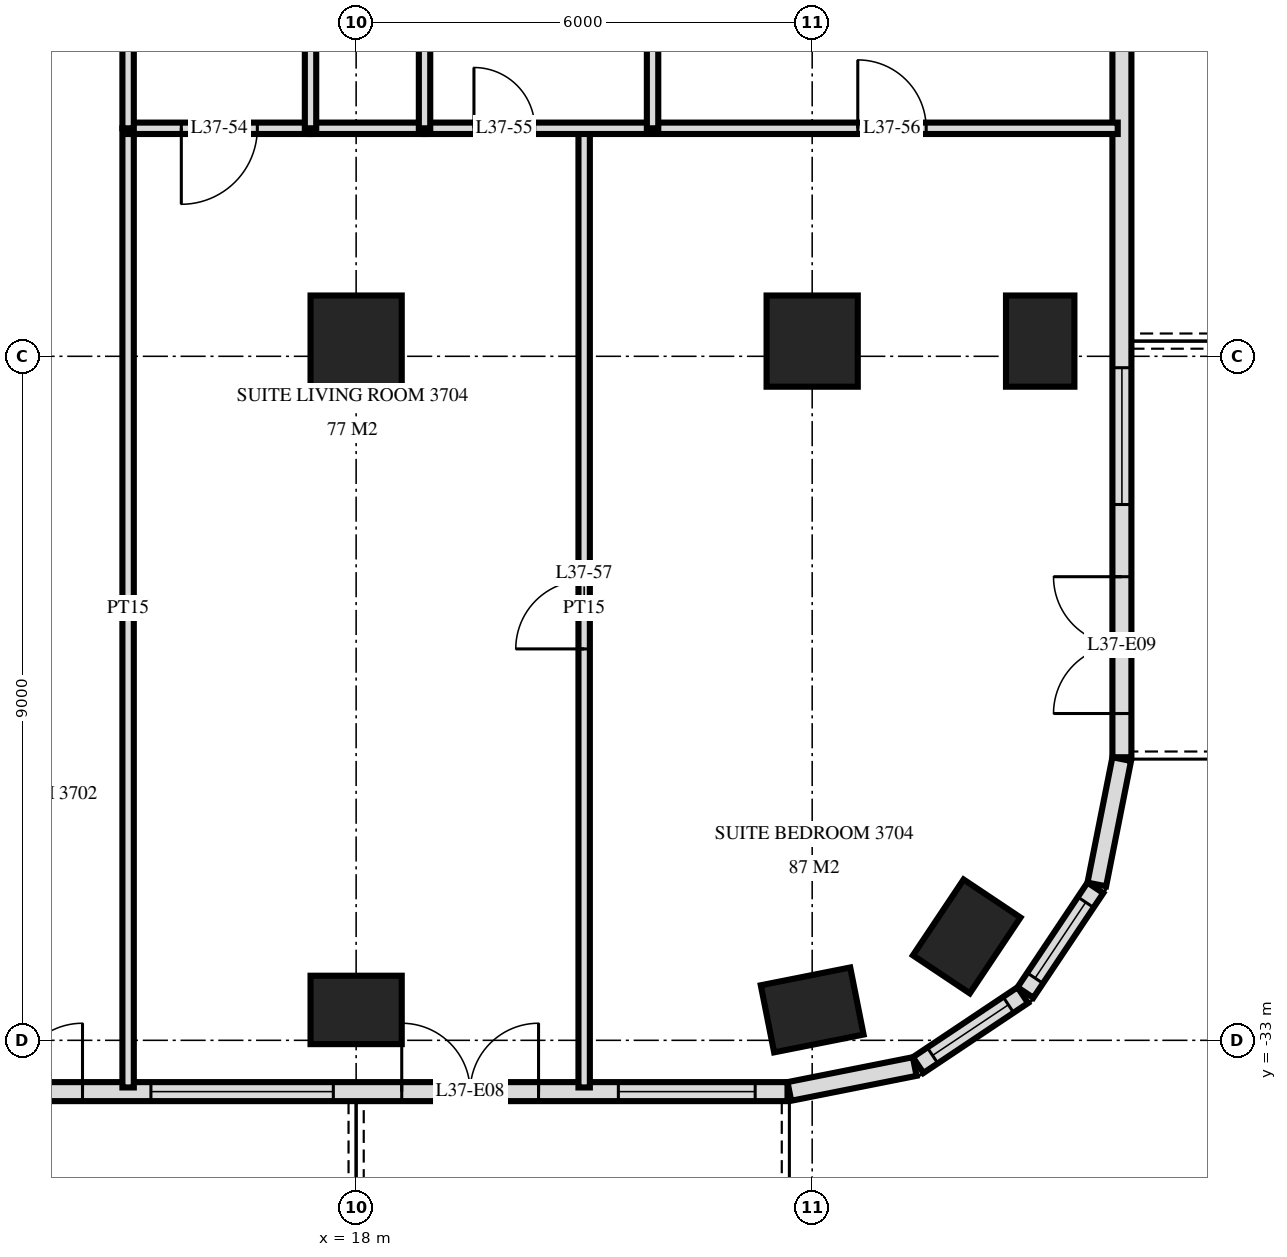
"""IFC4 building model, lengths in metres.
Left out: names, types, materials, properties, quantities, classifications, styles, units other than length and angle.
Written with IfcOpenShell. Run it as: python <this file> out.ifc"""

import sys

from ifc_helpers import new_model, si_unit, direction, frame, frame_2d, origin, origin_2d, place, context, subcontext, project, spatial, rectangle, extrude, element, fill, save


model = new_model("IFC4")
c1 = context("Model", 3, precision=1e-05, world=origin(), true_north=direction((0.0, 1.0)))
c2 = subcontext(c1, "Body", "Model", "MODEL_VIEW")
j1 = project(units=[si_unit("LENGTHUNIT", "METRE"), si_unit("PLANEANGLEUNIT", "RADIAN")], contexts=[c1])
p1 = place(None, origin())
s1 = spatial("IfcSite", under=j1, at=p1, CompositionType="ELEMENT")
p2 = place(p1, origin())
s2 = spatial("IfcBuilding", under=s1, at=p2, CompositionType="ELEMENT")
p3 = place(p2, frame((0.0, 0.0, 145.2)))
s3 = spatial("IfcBuildingStorey", under=s2, at=p3, CompositionType="ELEMENT", Elevation=145.2)
p4 = place(p3, frame((18.0, -32.6, 0.0), z_axis=(0.0, 0.0, 1.0), x_axis=(1.0, 0.0, 0.0)))
e1 = element("IfcColumn", 1, at=p4, inside=s3, PredefinedType="COLUMN", context=c2, shape_type="SweptSolid", body=[
    extrude(rectangle(XDim=1.2, YDim=0.9, at=origin_2d()), origin(), (0.0, 0.0, 1.0), 3.6),
])
p5 = place(p3, frame((18.0, -23.8, 0.0), z_axis=(0.0, 0.0, 1.0), x_axis=(1.0, 0.0, 0.0)))
e2 = element("IfcColumn", 2, at=p5, inside=s3, PredefinedType="COLUMN", context=c2, shape_type="SweptSolid", body=[
    extrude(rectangle(XDim=1.2, YDim=1.2, at=origin_2d()), origin(), (0.0, 0.0, 1.0), 3.6),
])
p6 = place(p3, frame((24.0, -32.6, 0.0), z_axis=(0.0, 0.0, 1.0), x_axis=(0.980792089743, 0.195056086032, 0.0)))
e3 = element("IfcColumn", 3, at=p6, inside=s3, PredefinedType="COLUMN", context=c2, shape_type="SweptSolid", body=[
    extrude(rectangle(XDim=1.2, YDim=0.9, at=origin_2d()), origin(), (0.0, 0.0, 1.0), 3.6),
])
p7 = place(p3, frame((24.0, -23.8, 0.0), z_axis=(0.0, 0.0, 1.0), x_axis=(1.0, 0.0, 0.0)))
e4 = element("IfcColumn", 4, at=p7, inside=s3, PredefinedType="COLUMN", context=c2, shape_type="SweptSolid", body=[
    extrude(rectangle(XDim=1.2, YDim=1.2, at=origin_2d()), origin(), (0.0, 0.0, 1.0), 3.6),
])
for number, where, z_axis, x_axis in (
    (5, (26.033, -31.633, 0.0), (0.0, 0.0, 1.0), (0.556, 0.831, 0.0)),
    (6, (27.0, -23.8, 0.0), (0.0, 0.0, 1.0), (0.0, 1.0, 0.0)),
):
    element("IfcColumn", number, at=place(p3, frame(where, z_axis=z_axis, x_axis=x_axis)), inside=s3, PredefinedType="COLUMN", context=c2, shape_type="SweptSolid", body=[
        extrude(rectangle(XDim=1.2, YDim=0.9, at=origin_2d()), origin(), (0.0, 0.0, 1.0), 3.6),
    ])
p8 = place(p3, frame((-23.675, -33.675, 0.0), z_axis=(0.0, 0.0, 1.0), x_axis=(1.0, 0.0, 0.0)))
e7 = element("IfcWall", 7, at=p8, inside=s3, PredefinedType="SOLIDWALL", context=c2, shape_type="SweptSolid", body=[
    extrude(rectangle(XDim=47.351, YDim=0.25, at=frame_2d((23.675, 0.0))), origin(), (0.0, 0.0, 1.0), 3.32),
])
p9 = place(p8, frame((3.425, 0.0, 0.0)))
e8 = element("IfcOpeningElement", 8, at=p9, cuts=e7, PredefinedType="OPENING", context=c2, shape_type="SweptSolid", body=[
    extrude(rectangle(XDim=1.8, YDim=2.4, at=frame_2d((0.9, 1.2))), frame((0.0, 0.135, 0.0), z_axis=(0.0, -1.0, 0.0), x_axis=(1.0, 0.0, 0.0)), (0.0, 0.0, 1.0), 0.27),
])
p10 = place(p8, frame((6.275, 0.0, 0.0)))
e9 = element("IfcOpeningElement", 9, at=p10, cuts=e7, PredefinedType="OPENING", context=c2, shape_type="SweptSolid", body=[
    extrude(rectangle(XDim=1.8, YDim=2.4, at=frame_2d((0.9, 1.2))), frame((0.0, 0.135, 0.0), z_axis=(0.0, -1.0, 0.0), x_axis=(1.0, 0.0, 0.0)), (0.0, 0.0, 1.0), 0.27),
])
p11 = place(p8, frame((8.975, 0.0, 0.3)))
e10 = element("IfcOpeningElement", 10, at=p11, cuts=e7, PredefinedType="OPENING", context=c2, shape_type="SweptSolid", body=[
    extrude(rectangle(XDim=2.4, YDim=2.1, at=frame_2d((1.2, 1.05))), frame((0.0, 0.135, 0.0), z_axis=(0.0, -1.0, 0.0), x_axis=(1.0, 0.0, 0.0)), (0.0, 0.0, 1.0), 0.27),
])
p12 = place(p8, frame((12.275, 0.0, 0.0)))
e11 = element("IfcOpeningElement", 11, at=p12, cuts=e7, PredefinedType="OPENING", context=c2, shape_type="SweptSolid", body=[
    extrude(rectangle(XDim=1.8, YDim=2.4, at=frame_2d((0.9, 1.2))), frame((0.0, 0.135, 0.0), z_axis=(0.0, -1.0, 0.0), x_axis=(1.0, 0.0, 0.0)), (0.0, 0.0, 1.0), 0.27),
])
p13 = place(p8, frame((14.975, 0.0, 0.3)))
e12 = element("IfcOpeningElement", 12, at=p13, cuts=e7, PredefinedType="OPENING", context=c2, shape_type="SweptSolid", body=[
    extrude(rectangle(XDim=2.4, YDim=2.1, at=frame_2d((1.2, 1.05))), frame((0.0, 0.135, 0.0), z_axis=(0.0, -1.0, 0.0), x_axis=(1.0, 0.0, 0.0)), (0.0, 0.0, 1.0), 0.27),
])
p14 = place(p8, frame((21.275, 0.0, 0.0)))
e13 = element("IfcOpeningElement", 13, at=p14, cuts=e7, PredefinedType="OPENING", context=c2, shape_type="SweptSolid", body=[
    extrude(rectangle(XDim=1.8, YDim=2.4, at=frame_2d((0.9, 1.2))), frame((0.0, 0.135, 0.0), z_axis=(0.0, -1.0, 0.0), x_axis=(1.0, 0.0, 0.0)), (0.0, 0.0, 1.0), 0.27),
])
p15 = place(p8, frame((24.275, 0.0, 0.0)))
e14 = element("IfcOpeningElement", 14, at=p15, cuts=e7, PredefinedType="OPENING", context=c2, shape_type="SweptSolid", body=[
    extrude(rectangle(XDim=1.8, YDim=2.4, at=frame_2d((0.9, 1.2))), frame((0.0, 0.135, 0.0), z_axis=(0.0, -1.0, 0.0), x_axis=(1.0, 0.0, 0.0)), (0.0, 0.0, 1.0), 0.27),
])
p16 = place(p8, frame((30.275, 0.0, 0.0)))
e15 = element("IfcOpeningElement", 15, at=p16, cuts=e7, PredefinedType="OPENING", context=c2, shape_type="SweptSolid", body=[
    extrude(rectangle(XDim=1.8, YDim=2.4, at=frame_2d((0.9, 1.2))), frame((0.0, 0.135, 0.0), z_axis=(0.0, -1.0, 0.0), x_axis=(1.0, 0.0, 0.0)), (0.0, 0.0, 1.0), 0.27),
])
p17 = place(p8, frame((32.975, 0.0, 0.3)))
e16 = element("IfcOpeningElement", 16, at=p17, cuts=e7, PredefinedType="OPENING", context=c2, shape_type="SweptSolid", body=[
    extrude(rectangle(XDim=2.4, YDim=2.1, at=frame_2d((1.2, 1.05))), frame((0.0, 0.135, 0.0), z_axis=(0.0, -1.0, 0.0), x_axis=(1.0, 0.0, 0.0)), (0.0, 0.0, 1.0), 0.27),
])
p18 = place(p8, frame((36.275, 0.0, 0.0)))
e17 = element("IfcOpeningElement", 17, at=p18, cuts=e7, PredefinedType="OPENING", context=c2, shape_type="SweptSolid", body=[
    extrude(rectangle(XDim=1.8, YDim=2.4, at=frame_2d((0.9, 1.2))), frame((0.0, 0.135, 0.0), z_axis=(0.0, -1.0, 0.0), x_axis=(1.0, 0.0, 0.0)), (0.0, 0.0, 1.0), 0.27),
])
p19 = place(p8, frame((38.975, 0.0, 0.3)))
e18 = element("IfcOpeningElement", 18, at=p19, cuts=e7, PredefinedType="OPENING", context=c2, shape_type="SweptSolid", body=[
    extrude(rectangle(XDim=2.4, YDim=2.1, at=frame_2d((1.2, 1.05))), frame((0.0, 0.135, 0.0), z_axis=(0.0, -1.0, 0.0), x_axis=(1.0, 0.0, 0.0)), (0.0, 0.0, 1.0), 0.27),
])
p20 = place(p8, frame((42.275, 0.0, 0.0)))
e19 = element("IfcOpeningElement", 19, at=p20, cuts=e7, PredefinedType="OPENING", context=c2, shape_type="SweptSolid", body=[
    extrude(rectangle(XDim=1.8, YDim=2.4, at=frame_2d((0.9, 1.2))), frame((0.0, 0.135, 0.0), z_axis=(0.0, -1.0, 0.0), x_axis=(1.0, 0.0, 0.0)), (0.0, 0.0, 1.0), 0.27),
])
p21 = place(p8, frame((45.125, 0.0, 0.3)))
e20 = element("IfcOpeningElement", 20, at=p21, cuts=e7, PredefinedType="OPENING", context=c2, shape_type="SweptSolid", body=[
    extrude(rectangle(XDim=1.8, YDim=2.1, at=frame_2d((0.9, 1.05))), frame((0.0, 0.135, 0.0), z_axis=(0.0, -1.0, 0.0), x_axis=(1.0, 0.0, 0.0)), (0.0, 0.0, 1.0), 0.27),
])
p22 = place(p3, frame((23.7, -33.673, 0.0), z_axis=(0.0, 0.0, 1.0), x_axis=(0.980775640221, 0.19513878023, 0.0)))
e21 = element("IfcWall", 21, at=p22, inside=s3, PredefinedType="SOLIDWALL", context=c2, shape_type="SweptSolid", body=[
    extrude(rectangle(XDim=1.681, YDim=0.25, at=frame_2d((0.841, 0.0))), origin(), (0.0, 0.0, 1.0), 3.32),
])
p23 = place(p3, frame((25.394, -33.326, 0.0), z_axis=(0.0, 0.0, 1.0), x_axis=(0.831482937015, 0.55555029066, 0.0)))
e22 = element("IfcWall", 22, at=p23, inside=s3, PredefinedType="SOLIDWALL", context=c2, shape_type="SweptSolid", body=[
    extrude(rectangle(XDim=1.656, YDim=0.25, at=frame_2d((0.828, 0.0))), origin(), (0.0, 0.0, 1.0), 3.32),
])
p24 = place(p23, frame((0.228, 0.0, 0.9)))
e23 = element("IfcOpeningElement", 23, at=p24, cuts=e22, PredefinedType="OPENING", context=c2, shape_type="SweptSolid", body=[
    extrude(rectangle(XDim=1.2, YDim=1.5, at=frame_2d((0.6, 0.75))), frame((0.0, 0.135, 0.0), z_axis=(0.0, -1.0, 0.0), x_axis=(1.0, 0.0, 0.0)), (0.0, 0.0, 1.0), 0.27),
])
p25 = place(p3, frame((26.806, -32.371, 0.0), z_axis=(0.0, 0.0, 1.0), x_axis=(0.55555029066, 0.831482937015, 0.0)))
e24 = element("IfcWall", 24, at=p25, inside=s3, PredefinedType="SOLIDWALL", context=c2, shape_type="SweptSolid", body=[
    extrude(rectangle(XDim=1.656, YDim=0.25, at=frame_2d((0.828, 0.0))), origin(), (0.0, 0.0, 1.0), 3.32),
])
p26 = place(p25, frame((0.228, 0.0, 0.9)))
e25 = element("IfcOpeningElement", 25, at=p26, cuts=e24, PredefinedType="OPENING", context=c2, shape_type="SweptSolid", body=[
    extrude(rectangle(XDim=1.2, YDim=1.5, at=frame_2d((0.6, 0.75))), frame((0.0, 0.135, 0.0), z_axis=(0.0, -1.0, 0.0), x_axis=(1.0, 0.0, 0.0)), (0.0, 0.0, 1.0), 0.27),
])
p27 = place(p3, frame((27.745, -30.949, 0.0), z_axis=(0.0, 0.0, 1.0), x_axis=(0.194999110559, 0.980803419081, 0.0)))
e26 = element("IfcWall", 26, at=p27, inside=s3, PredefinedType="SOLIDWALL", context=c2, shape_type="SweptSolid", body=[
    extrude(rectangle(XDim=1.681, YDim=0.25, at=frame_2d((0.841, 0.0))), origin(), (0.0, 0.0, 1.0), 3.32),
])
p28 = place(p3, frame((28.075, -29.275, 0.0), z_axis=(0.0, 0.0, 1.0), x_axis=(0.0, 1.0, 0.0)))
e27 = element("IfcWall", 27, at=p28, inside=s3, PredefinedType="SOLIDWALL", context=c2, shape_type="SweptSolid", body=[
    extrude(rectangle(XDim=25.951, YDim=0.25, at=frame_2d((12.975, 0.0))), origin(), (0.0, 0.0, 1.0), 3.32),
])
p29 = place(p28, frame((0.575, 0.0, 0.0)))
e28 = element("IfcOpeningElement", 28, at=p29, cuts=e27, PredefinedType="OPENING", context=c2, shape_type="SweptSolid", body=[
    extrude(rectangle(XDim=1.8, YDim=2.4, at=frame_2d((0.9, 1.2))), frame((0.0, 0.135, 0.0), z_axis=(0.0, -1.0, 0.0), x_axis=(1.0, 0.0, 0.0)), (0.0, 0.0, 1.0), 0.27),
])
p30 = place(p28, frame((3.325, 0.0, 0.3)))
e29 = element("IfcOpeningElement", 29, at=p30, cuts=e27, PredefinedType="OPENING", context=c2, shape_type="SweptSolid", body=[
    extrude(rectangle(XDim=1.8, YDim=2.1, at=frame_2d((0.9, 1.05))), frame((0.0, 0.135, 0.0), z_axis=(0.0, -1.0, 0.0), x_axis=(1.0, 0.0, 0.0)), (0.0, 0.0, 1.0), 0.27),
])
p31 = place(p28, frame((9.475, 0.0, 0.0)))
e30 = element("IfcOpeningElement", 30, at=p31, cuts=e27, PredefinedType="OPENING", context=c2, shape_type="SweptSolid", body=[
    extrude(rectangle(XDim=1.8, YDim=2.4, at=frame_2d((0.9, 1.2))), frame((0.0, 0.135, 0.0), z_axis=(0.0, -1.0, 0.0), x_axis=(1.0, 0.0, 0.0)), (0.0, 0.0, 1.0), 0.27),
])
p32 = place(p28, frame((14.575, 0.0, 0.3)))
e31 = element("IfcOpeningElement", 31, at=p32, cuts=e27, PredefinedType="OPENING", context=c2, shape_type="SweptSolid", body=[
    extrude(rectangle(XDim=2.4, YDim=2.1, at=frame_2d((1.2, 1.05))), frame((0.0, 0.135, 0.0), z_axis=(0.0, -1.0, 0.0), x_axis=(1.0, 0.0, 0.0)), (0.0, 0.0, 1.0), 0.27),
])
p33 = place(p28, frame((17.875, 0.0, 0.0)))
e32 = element("IfcOpeningElement", 32, at=p33, cuts=e27, PredefinedType="OPENING", context=c2, shape_type="SweptSolid", body=[
    extrude(rectangle(XDim=1.8, YDim=2.4, at=frame_2d((0.9, 1.2))), frame((0.0, 0.135, 0.0), z_axis=(0.0, -1.0, 0.0), x_axis=(1.0, 0.0, 0.0)), (0.0, 0.0, 1.0), 0.27),
])
p34 = place(p3, frame((21.9, -21.0, 0.0), z_axis=(0.0, 0.0, 1.0), x_axis=(0.0, 1.0, 0.0)))
e33 = element("IfcWall", 33, at=p34, inside=s3, PredefinedType="PARTITIONING", context=c2, shape_type="SweptSolid", body=[
    extrude(rectangle(XDim=4.2, YDim=0.15, at=frame_2d((2.1, 0.0))), origin(), (0.0, 0.0, 1.0), 3.32),
])
p35 = place(p3, frame((21.0, -33.62, 0.0), z_axis=(0.0, 0.0, 1.0), x_axis=(0.0, 1.0, 0.0)))
e34 = element("IfcWall", 34, at=p35, inside=s3, PredefinedType="PARTITIONING", context=c2, shape_type="SweptSolid", body=[
    extrude(rectangle(XDim=12.62, YDim=0.15, at=frame_2d((6.31, 0.0))), origin(), (0.0, 0.0, 1.0), 3.32),
])
p36 = place(p35, frame((5.77, 0.0, 0.0)))
e35 = element("IfcOpeningElement", 35, at=p36, cuts=e34, PredefinedType="OPENING", context=c2, shape_type="SweptSolid", body=[
    extrude(rectangle(XDim=0.9, YDim=2.1, at=frame_2d((0.45, 1.05))), frame((0.0, 0.085, 0.0), z_axis=(0.0, -1.0, 0.0), x_axis=(1.0, 0.0, 0.0)), (0.0, 0.0, 1.0), 0.17),
])
p37 = place(p3, frame((18.9, -21.0, 0.0), z_axis=(0.0, 0.0, 1.0), x_axis=(0.0, 1.0, 0.0)))
e36 = element("IfcWall", 36, at=p37, inside=s3, PredefinedType="PLUMBINGWALL", context=c2, shape_type="SweptSolid", body=[
    extrude(rectangle(XDim=4.2, YDim=0.15, at=frame_2d((2.1, 0.0))), origin(), (0.0, 0.0, 1.0), 3.32),
])
p38 = place(p3, frame((17.4, -21.0, 0.0), z_axis=(0.0, 0.0, 1.0), x_axis=(0.0, 1.0, 0.0)))
e37 = element("IfcWall", 37, at=p38, inside=s3, PredefinedType="PARTITIONING", context=c2, shape_type="SweptSolid", body=[
    extrude(rectangle(XDim=4.2, YDim=0.15, at=frame_2d((2.1, 0.0))), origin(), (0.0, 0.0, 1.0), 3.32),
])
p39 = place(p38, frame((1.6, 0.0, 0.0)))
e38 = element("IfcOpeningElement", 38, at=p39, cuts=e37, PredefinedType="OPENING", context=c2, shape_type="SweptSolid", body=[
    extrude(rectangle(XDim=1.0, YDim=2.1, at=frame_2d((0.5, 1.05))), frame((0.0, 0.085, 0.0), z_axis=(0.0, -1.0, 0.0), x_axis=(1.0, 0.0, 0.0)), (0.0, 0.0, 1.0), 0.17),
])
p40 = place(p3, frame((15.0, -21.0, 0.0), z_axis=(0.0, 0.0, 1.0), x_axis=(0.0, 1.0, 0.0)))
e39 = element("IfcWall", 39, at=p40, inside=s3, PredefinedType="PARTITIONING", context=c2, shape_type="SweptSolid", body=[
    extrude(rectangle(XDim=4.2, YDim=0.15, at=frame_2d((2.1, 0.0))), origin(), (0.0, 0.0, 1.0), 3.32),
])
p41 = place(p3, frame((15.0, -33.62, 0.0), z_axis=(0.0, 0.0, 1.0), x_axis=(0.0, 1.0, 0.0)))
e40 = element("IfcWall", 40, at=p41, inside=s3, PredefinedType="PARTITIONING", context=c2, shape_type="SweptSolid", body=[
    extrude(rectangle(XDim=12.62, YDim=0.15, at=frame_2d((6.31, 0.0))), origin(), (0.0, 0.0, 1.0), 3.32),
])
p42 = place(p3, frame((15.0, -21.0, 0.0), z_axis=(0.0, 0.0, 1.0), x_axis=(1.0, 0.0, 0.0)))
e41 = element("IfcWall", 41, at=p42, inside=s3, PredefinedType="PARTITIONING", context=c2, shape_type="SweptSolid", body=[
    extrude(rectangle(XDim=2.4, YDim=0.15, at=frame_2d((1.2, 0.0))), origin(), (0.0, 0.0, 1.0), 3.32),
])
p43 = place(p42, frame((0.7, 0.0, 0.0)))
e42 = element("IfcOpeningElement", 42, at=p43, cuts=e41, PredefinedType="OPENING", context=c2, shape_type="SweptSolid", body=[
    extrude(rectangle(XDim=1.0, YDim=2.1, at=frame_2d((0.5, 1.05))), frame((0.0, 0.085, 0.0), z_axis=(0.0, -1.0, 0.0), x_axis=(1.0, 0.0, 0.0)), (0.0, 0.0, 1.0), 0.17),
])
p44 = place(p3, frame((18.9, -21.0, 0.0), z_axis=(0.0, 0.0, 1.0), x_axis=(1.0, 0.0, 0.0)))
e43 = element("IfcWall", 43, at=p44, inside=s3, PredefinedType="PARTITIONING", context=c2, shape_type="SweptSolid", body=[
    extrude(rectangle(XDim=9.12, YDim=0.15, at=frame_2d((4.56, 0.0))), origin(), (0.0, 0.0, 1.0), 3.32),
])
p45 = place(p44, frame((0.65, 0.0, 0.0)))
e44 = element("IfcOpeningElement", 44, at=p45, cuts=e43, PredefinedType="OPENING", context=c2, shape_type="SweptSolid", body=[
    extrude(rectangle(XDim=0.8, YDim=2.1, at=frame_2d((0.4, 1.05))), frame((0.0, 0.085, 0.0), z_axis=(0.0, -1.0, 0.0), x_axis=(1.0, 0.0, 0.0)), (0.0, 0.0, 1.0), 0.17),
])
p46 = place(p44, frame((5.7, 0.0, 0.0)))
e45 = element("IfcOpeningElement", 45, at=p46, cuts=e43, PredefinedType="OPENING", context=c2, shape_type="SweptSolid", body=[
    extrude(rectangle(XDim=0.9, YDim=2.1, at=frame_2d((0.45, 1.05))), frame((0.0, 0.085, 0.0), z_axis=(0.0, -1.0, 0.0), x_axis=(1.0, 0.0, 0.0)), (0.0, 0.0, 1.0), 0.17),
])
p47 = place(p3, frame((17.4, -21.0, 0.0), z_axis=(0.0, 0.0, 1.0), x_axis=(1.0, 0.0, 0.0)))
e46 = element("IfcWall", 46, at=p47, inside=s3, PredefinedType="PLUMBINGWALL", context=c2, shape_type="SweptSolid", body=[
    extrude(rectangle(XDim=1.5, YDim=0.15, at=frame_2d((0.75, 0.0))), origin(), (0.0, 0.0, 1.0), 3.32),
])
p48 = place(p24, origin())
e47 = element("IfcWindow", 47, at=p48, inside=s3, PartitioningType="SINGLE_PANEL", PredefinedType="WINDOW", context=c2, shape_type="SweptSolid", body=[
    extrude(rectangle(XDim=1.2, YDim=1.5, at=frame_2d((0.6, 0.75))), frame((0.0, 0.03, 0.0), z_axis=(0.0, -1.0, 0.0), x_axis=(1.0, 0.0, 0.0)), (0.0, 0.0, 1.0), 0.06),
])
fill(e23, e47)
p49 = place(p26, origin())
e48 = element("IfcWindow", 48, at=p49, inside=s3, PartitioningType="SINGLE_PANEL", PredefinedType="WINDOW", context=c2, shape_type="SweptSolid", body=[
    extrude(rectangle(XDim=1.2, YDim=1.5, at=frame_2d((0.6, 0.75))), frame((0.0, 0.03, 0.0), z_axis=(0.0, -1.0, 0.0), x_axis=(1.0, 0.0, 0.0)), (0.0, 0.0, 1.0), 0.06),
])
fill(e25, e48)
p50 = place(p18, origin())
e49 = element("IfcDoor", 49, at=p50, inside=s3, OperationType="DOUBLE_DOOR_SINGLE_SWING", PredefinedType="DOOR", context=c2, shape_type="SweptSolid", body=[
    extrude(rectangle(XDim=1.8, YDim=2.4, at=frame_2d((0.9, 1.2))), frame((0.0, 0.025, 0.0), z_axis=(0.0, -1.0, 0.0), x_axis=(1.0, 0.0, 0.0)), (0.0, 0.0, 1.0), 0.05),
])
fill(e17, e49)
p51 = place(p19, origin())
e50 = element("IfcWindow", 50, at=p51, inside=s3, PartitioningType="SINGLE_PANEL", PredefinedType="WINDOW", context=c2, shape_type="SweptSolid", body=[
    extrude(rectangle(XDim=2.4, YDim=2.1, at=frame_2d((1.2, 1.05))), frame((0.0, 0.03, 0.0), z_axis=(0.0, -1.0, 0.0), x_axis=(1.0, 0.0, 0.0)), (0.0, 0.0, 1.0), 0.06),
])
fill(e18, e50)
p52 = place(p20, origin())
e51 = element("IfcDoor", 51, at=p52, inside=s3, OperationType="DOUBLE_DOOR_SINGLE_SWING", PredefinedType="DOOR", context=c2, shape_type="SweptSolid", body=[
    extrude(rectangle(XDim=1.8, YDim=2.4, at=frame_2d((0.9, 1.2))), frame((0.0, 0.025, 0.0), z_axis=(0.0, -1.0, 0.0), x_axis=(1.0, 0.0, 0.0)), (0.0, 0.0, 1.0), 0.05),
])
fill(e19, e51)
p53 = place(p21, origin())
e52 = element("IfcWindow", 52, at=p53, inside=s3, PartitioningType="SINGLE_PANEL", PredefinedType="WINDOW", context=c2, shape_type="SweptSolid", body=[
    extrude(rectangle(XDim=1.8, YDim=2.1, at=frame_2d((0.9, 1.05))), frame((0.0, 0.03, 0.0), z_axis=(0.0, -1.0, 0.0), x_axis=(1.0, 0.0, 0.0)), (0.0, 0.0, 1.0), 0.06),
])
fill(e20, e52)
p54 = place(p29, origin())
e53 = element("IfcDoor", 53, at=p54, inside=s3, OperationType="DOUBLE_DOOR_SINGLE_SWING", PredefinedType="DOOR", context=c2, shape_type="SweptSolid", body=[
    extrude(rectangle(XDim=1.8, YDim=2.4, at=frame_2d((0.9, 1.2))), frame((0.0, 0.025, 0.0), z_axis=(0.0, -1.0, 0.0), x_axis=(1.0, 0.0, 0.0)), (0.0, 0.0, 1.0), 0.05),
])
fill(e28, e53)
p55 = place(p30, origin())
e54 = element("IfcWindow", 54, at=p55, inside=s3, PartitioningType="SINGLE_PANEL", PredefinedType="WINDOW", context=c2, shape_type="SweptSolid", body=[
    extrude(rectangle(XDim=1.8, YDim=2.1, at=frame_2d((0.9, 1.05))), frame((0.0, 0.03, 0.0), z_axis=(0.0, -1.0, 0.0), x_axis=(1.0, 0.0, 0.0)), (0.0, 0.0, 1.0), 0.06),
])
fill(e29, e54)
p56 = place(p43, frame((0.5, 0.0, 0.0), z_axis=(0.0, 0.0, 1.0), x_axis=(-1.0, 0.0, 0.0)))
e55 = element("IfcDoor", 55, at=p56, inside=s3, OperationType="SINGLE_SWING_LEFT", PredefinedType="DOOR", context=c2, shape_type="SweptSolid", body=[
    extrude(rectangle(XDim=1.0, YDim=2.1, at=frame_2d((0.0, 1.05))), frame((0.0, -0.025, 0.0), z_axis=(0.0, 1.0, 0.0), x_axis=(-1.0, 0.0, 0.0)), (0.0, 0.0, 1.0), 0.05),
])
fill(e42, e55)
p57 = place(p45, origin())
e56 = element("IfcDoor", 56, at=p57, inside=s3, OperationType="SINGLE_SWING_RIGHT", PredefinedType="DOOR", context=c2, shape_type="SweptSolid", body=[
    extrude(rectangle(XDim=0.8, YDim=2.1, at=frame_2d((0.4, 1.05))), frame((0.0, 0.025, 0.0), z_axis=(0.0, -1.0, 0.0), x_axis=(1.0, 0.0, 0.0)), (0.0, 0.0, 1.0), 0.05),
])
fill(e44, e56)
p58 = place(p46, origin())
e57 = element("IfcDoor", 57, at=p58, inside=s3, OperationType="SINGLE_SWING_RIGHT", PredefinedType="DOOR", context=c2, shape_type="SweptSolid", body=[
    extrude(rectangle(XDim=0.9, YDim=2.1, at=frame_2d((0.45, 1.05))), frame((0.0, 0.025, 0.0), z_axis=(0.0, -1.0, 0.0), x_axis=(1.0, 0.0, 0.0)), (0.0, 0.0, 1.0), 0.05),
])
fill(e45, e57)
p59 = place(p36, origin())
e58 = element("IfcDoor", 58, at=p59, inside=s3, OperationType="SINGLE_SWING_RIGHT", PredefinedType="DOOR", context=c2, shape_type="SweptSolid", body=[
    extrude(rectangle(XDim=0.9, YDim=2.1, at=frame_2d((0.45, 1.05))), frame((0.0, 0.025, 0.0), z_axis=(0.0, -1.0, 0.0), x_axis=(1.0, 0.0, 0.0)), (0.0, 0.0, 1.0), 0.05),
])
fill(e35, e58)
save(model, sys.argv[1])
